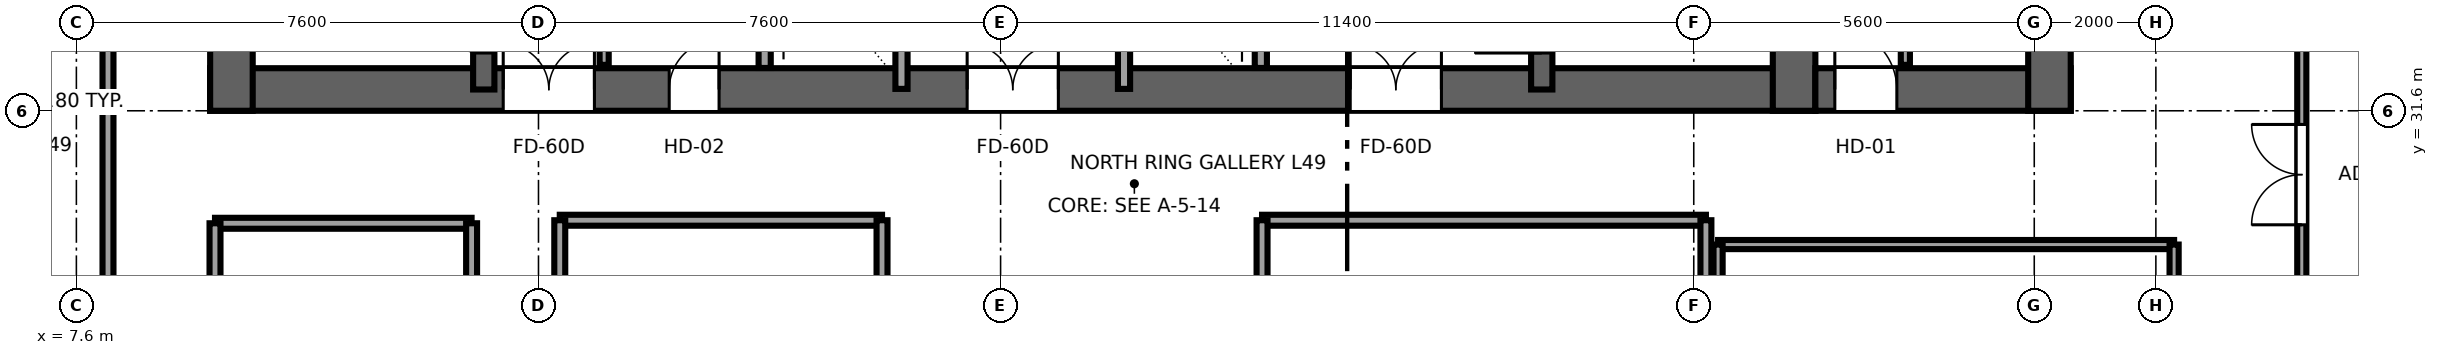
"""IFC4 building model, lengths in metres.
Left out: names, types, materials, properties, quantities, classifications, styles, units other than length and angle.
Written with IfcOpenShell. Run it as: python <this file> out.ifc"""

import sys

from ifc_helpers import new_model, si_unit, direction, frame, frame_2d, origin, place, context, subcontext, project, spatial, rectangle, extrude, source, transform, mapped, element, fill, save


model = new_model("IFC4")
c1 = context("Model", 3, precision=1e-05, world=origin(), true_north=direction((0.0, 1.0)))
c2 = subcontext(c1, "Body", "Model", "MODEL_VIEW")
j1 = project(units=[si_unit("LENGTHUNIT", "METRE"), si_unit("PLANEANGLEUNIT", "RADIAN")], contexts=[c1])
p1 = place(None, origin())
s1 = spatial("IfcSite", under=j1, at=p1, CompositionType="ELEMENT")
p2 = place(p1, origin())
s2 = spatial("IfcBuilding", under=s1, at=p2, CompositionType="ELEMENT")
p3 = place(p2, frame((0.0, 0.0, 187.55)))
s3 = spatial("IfcBuildingStorey", under=s2, at=p3, CompositionType="ELEMENT", Elevation=187.55)
p4 = place(p3, frame((9.8, 31.95, 0.0), z_axis=(0.0, 0.0, 1.0), x_axis=(1.0, 0.0, 0.0)))
e1 = element("IfcWall", 1, at=p4, inside=s3, PredefinedType="SHEAR", context=c2, shape_type="SweptSolid", body=[
    extrude(rectangle(XDim=26.4, YDim=0.7, at=frame_2d((13.2, 0.0))), origin(), (0.0, 0.0, 1.0), 3.55),
])
p5 = place(p4, frame((6.32, 0.0, 0.0), z_axis=(0.0, 0.0, 1.0), x_axis=(-1.0, 0.0, 0.0)))
e2 = element("IfcOpeningElement", 2, at=p5, cuts=e1, PredefinedType="OPENING", context=c2, shape_type="SweptSolid", body=[
    extrude(rectangle(XDim=1.5, YDim=2.04, at=frame_2d((0.75, 1.02))), frame((0.0, 0.36, 0.0), z_axis=(0.0, -1.0, 0.0), x_axis=(1.0, 0.0, 0.0)), (0.0, 0.0, 1.0), 0.72),
])
p6 = place(p4, frame((13.95, 0.0, 0.0), z_axis=(0.0, 0.0, 1.0), x_axis=(-1.0, 0.0, 0.0)))
e3 = element("IfcOpeningElement", 3, at=p6, cuts=e1, PredefinedType="OPENING", context=c2, shape_type="SweptSolid", body=[
    extrude(rectangle(XDim=1.5, YDim=2.04, at=frame_2d((0.75, 1.02))), frame((0.0, 0.36, 0.0), z_axis=(0.0, -1.0, 0.0), x_axis=(1.0, 0.0, 0.0)), (0.0, 0.0, 1.0), 0.72),
])
p7 = place(p4, frame((20.25, 0.0, 0.0), z_axis=(0.0, 0.0, 1.0), x_axis=(-1.0, 0.0, 0.0)))
e4 = element("IfcOpeningElement", 4, at=p7, cuts=e1, PredefinedType="OPENING", context=c2, shape_type="SweptSolid", body=[
    extrude(rectangle(XDim=1.5, YDim=2.04, at=frame_2d((0.75, 1.02))), frame((0.0, 0.36, 0.0), z_axis=(0.0, -1.0, 0.0), x_axis=(1.0, 0.0, 0.0)), (0.0, 0.0, 1.0), 0.72),
])
p8 = place(p4, frame((8.37, 0.0, 0.0), z_axis=(0.0, 0.0, 1.0), x_axis=(-1.0, 0.0, 0.0)))
e5 = element("IfcOpeningElement", 5, at=p8, cuts=e1, PredefinedType="OPENING", context=c2, shape_type="SweptSolid", body=[
    extrude(rectangle(XDim=0.82, YDim=2.01, at=frame_2d((0.41, 1.005))), frame((0.0, 0.36, 0.0), z_axis=(0.0, -1.0, 0.0), x_axis=(1.0, 0.0, 0.0)), (0.0, 0.0, 1.0), 0.72),
])
for number, where, z_axis, x_axis in (
    (6, (10.15, 31.6, 0.0), (0.0, 0.0, 1.0), (0.0, 1.0, 0.0)),
    (7, (35.85, 31.6, 0.0), (0.0, 0.0, 1.0), (0.0, 1.0, 0.0)),
):
    element("IfcWall", number, at=place(p3, frame(where, z_axis=z_axis, x_axis=x_axis)), inside=s3, PredefinedType="SHEAR", context=c2, shape_type="SweptSolid", body=[
        extrude(rectangle(XDim=13.6, YDim=0.7, at=frame_2d((6.8, 0.0))), origin(), (0.0, 0.0, 1.0), 3.55),
    ])
p9 = place(p3, frame((14.3, 31.95, 0.0), z_axis=(0.0, 0.0, 1.0), x_axis=(0.0, 1.0, 0.0)))
e8 = element("IfcWall", 8, at=p9, inside=s3, PredefinedType="SHEAR", context=c2, shape_type="SweptSolid", body=[
    extrude(rectangle(XDim=12.9, YDim=0.35, at=frame_2d((6.45, 0.0))), origin(), (0.0, 0.0, 1.0), 3.55),
])
p10 = place(p9, frame((0.6, 0.0, 0.0)))
e9 = element("IfcOpeningElement", 9, at=p10, cuts=e8, PredefinedType="OPENING", context=c2, shape_type="SweptSolid", body=[
    extrude(rectangle(XDim=1.1, YDim=2.12, at=frame_2d((0.55, 1.06))), frame((0.0, 0.185, 0.0), z_axis=(0.0, -1.0, 0.0), x_axis=(1.0, 0.0, 0.0)), (0.0, 0.0, 1.0), 0.37),
])
p11 = place(p3, frame((31.7, 31.95, 0.0), z_axis=(0.0, 0.0, 1.0), x_axis=(0.0, 1.0, 0.0)))
e10 = element("IfcWall", 10, at=p11, inside=s3, PredefinedType="SHEAR", context=c2, shape_type="SweptSolid", body=[
    extrude(rectangle(XDim=12.9, YDim=0.35, at=frame_2d((6.45, 0.0))), origin(), (0.0, 0.0, 1.0), 3.55),
])
p12 = place(p11, frame((1.7, 0.0, 0.0), z_axis=(0.0, 0.0, 1.0), x_axis=(-1.0, 0.0, 0.0)))
e11 = element("IfcOpeningElement", 11, at=p12, cuts=e10, PredefinedType="OPENING", context=c2, shape_type="SweptSolid", body=[
    extrude(rectangle(XDim=1.1, YDim=2.12, at=frame_2d((0.55, 1.06))), frame((0.0, 0.185, 0.0), z_axis=(0.0, -1.0, 0.0), x_axis=(1.0, 0.0, 0.0)), (0.0, 0.0, 1.0), 0.37),
])
p13 = place(p3, frame((36.2, 31.95, 0.0), z_axis=(0.0, 0.0, 1.0), x_axis=(1.0, 0.0, 0.0)))
e12 = element("IfcWall", 12, at=p13, inside=s3, PredefinedType="SHEAR", context=c2, shape_type="SweptSolid", body=[
    extrude(rectangle(XDim=4.2, YDim=0.7, at=frame_2d((2.1, 0.0))), origin(), (0.0, 0.0, 1.0), 3.55),
])
p14 = place(p13, frame((1.34, 0.0, 0.0), z_axis=(0.0, 0.0, 1.0), x_axis=(-1.0, 0.0, 0.0)))
e13 = element("IfcOpeningElement", 13, at=p14, cuts=e12, PredefinedType="OPENING", context=c2, shape_type="SweptSolid", body=[
    extrude(rectangle(XDim=1.02, YDim=2.03, at=frame_2d((0.51, 1.015))), frame((0.0, 0.36, 0.0), z_axis=(0.0, -1.0, 0.0), x_axis=(1.0, 0.0, 0.0)), (0.0, 0.0, 1.0), 0.72),
])
p15 = place(p3, frame((40.05, 31.6, 0.0), z_axis=(0.0, 0.0, 1.0), x_axis=(0.0, 1.0, 0.0)))
e14 = element("IfcWall", 14, at=p15, inside=s3, PredefinedType="SHEAR", context=c2, shape_type="SweptSolid", body=[
    extrude(rectangle(XDim=13.6, YDim=0.7, at=frame_2d((6.8, 0.0))), origin(), (0.0, 0.0, 1.0), 3.55),
])
for number, where, z_axis, x_axis in (
    (15, (18.92, 32.304, 0.0), (0.0, 0.0, 1.0), (0.0, 1.0, 0.0)),
    (16, (27.08, 32.304, 0.0), (0.0, 0.0, 1.0), (0.0, 1.0, 0.0)),
):
    element("IfcWall", number, at=place(p3, frame(where, z_axis=z_axis, x_axis=x_axis)), inside=s3, PredefinedType="SOLIDWALL", context=c2, shape_type="SweptSolid", body=[
        extrude(rectangle(XDim=3.846, YDim=0.2, at=frame_2d((1.923, 0.0))), origin(), (0.0, 0.0, 1.0), 3.37),
    ])
p16 = place(p3, frame((21.17, 31.96, 0.0), z_axis=(0.0, 0.0, 1.0), x_axis=(0.0, 1.0, 0.0)))
e17 = element("IfcWall", 17, at=p16, inside=s3, PredefinedType="SOLIDWALL", context=c2, shape_type="SweptSolid", body=[
    extrude(rectangle(XDim=12.58, YDim=0.2, at=frame_2d((6.29, 0.0))), origin(), (0.0, 0.0, 1.0), 3.37),
])
p17 = place(p16, frame((5.74, 0.0, 0.0)))
e18 = element("IfcOpeningElement", 18, at=p17, cuts=e17, PredefinedType="OPENING", context=c2, shape_type="SweptSolid", body=[
    extrude(rectangle(XDim=1.1, YDim=2.12, at=frame_2d((0.55, 1.06))), frame((0.0, 0.11, 0.0), z_axis=(0.0, -1.0, 0.0), x_axis=(1.0, 0.0, 0.0)), (0.0, 0.0, 1.0), 0.22),
])
p18 = place(p16, frame((8.24, 0.0, 0.0)))
e19 = element("IfcOpeningElement", 19, at=p18, cuts=e17, PredefinedType="OPENING", context=c2, shape_type="SweptSolid", body=[
    extrude(rectangle(XDim=1.1, YDim=2.12, at=frame_2d((0.55, 1.06))), frame((0.0, 0.11, 0.0), z_axis=(0.0, -1.0, 0.0), x_axis=(1.0, 0.0, 0.0)), (0.0, 0.0, 1.0), 0.22),
])
p19 = place(p3, frame((24.83, 31.96, 0.0), z_axis=(0.0, 0.0, 1.0), x_axis=(0.0, 1.0, 0.0)))
e20 = element("IfcWall", 20, at=p19, inside=s3, PredefinedType="SOLIDWALL", context=c2, shape_type="SweptSolid", body=[
    extrude(rectangle(XDim=12.58, YDim=0.2, at=frame_2d((6.29, 0.0))), origin(), (0.0, 0.0, 1.0), 3.37),
])
p20 = place(p19, frame((5.74, 0.0, 0.0)))
e21 = element("IfcOpeningElement", 21, at=p20, cuts=e20, PredefinedType="OPENING", context=c2, shape_type="SweptSolid", body=[
    extrude(rectangle(XDim=1.1, YDim=2.12, at=frame_2d((0.55, 1.06))), frame((0.0, 0.11, 0.0), z_axis=(0.0, -1.0, 0.0), x_axis=(1.0, 0.0, 0.0)), (0.0, 0.0, 1.0), 0.22),
])
p21 = place(p19, frame((8.24, 0.0, 0.0)))
e22 = element("IfcOpeningElement", 22, at=p21, cuts=e20, PredefinedType="OPENING", context=c2, shape_type="SweptSolid", body=[
    extrude(rectangle(XDim=1.1, YDim=2.12, at=frame_2d((0.55, 1.06))), frame((0.0, 0.11, 0.0), z_axis=(0.0, -1.0, 0.0), x_axis=(1.0, 0.0, 0.0)), (0.0, 0.0, 1.0), 0.22),
])
p22 = place(p3, frame((16.28, 32.355, 0.0), z_axis=(0.0, 0.0, 1.0), x_axis=(0.0, 1.0, 0.0)))
e23 = element("IfcWall", 23, at=p22, inside=s3, PredefinedType="PARTITIONING", context=c2, shape_type="SweptSolid", body=[
    extrude(rectangle(XDim=0.865, YDim=0.15, at=frame_2d((0.433, 0.0))), origin(), (0.0, 0.0, 1.0), 3.37),
])
p23 = place(p3, frame((37.68, 32.355, 0.0), z_axis=(0.0, 0.0, 1.0), x_axis=(0.0, 1.0, 0.0)))
e24 = element("IfcWall", 24, at=p23, inside=s3, PredefinedType="PARTITIONING", context=c2, shape_type="SweptSolid", body=[
    extrude(rectangle(XDim=3.845, YDim=0.15, at=frame_2d((1.922, 0.0))), origin(), (0.0, 0.0, 1.0), 3.37),
])
p24 = place(p23, frame((1.413, 0.0, 0.0)))
e25 = element("IfcOpeningElement", 25, at=p24, cuts=e24, PredefinedType="OPENING", context=c2, shape_type="SweptSolid", body=[
    extrude(rectangle(XDim=1.02, YDim=2.03, at=frame_2d((0.51, 1.015))), frame((0.0, 0.085, 0.0), z_axis=(0.0, -1.0, 0.0), x_axis=(1.0, 0.0, 0.0)), (0.0, 0.0, 1.0), 0.17),
])
p25 = place(p3, frame((8.12, 22.7, 0.0), z_axis=(0.0, 0.0, 1.0), x_axis=(0.0, 1.0, 0.0)))
e26 = element("IfcWall", 26, at=p25, inside=s3, PredefinedType="PARTITIONING", context=c2, shape_type="SweptSolid", body=[
    extrude(rectangle(XDim=13.1, YDim=0.18, at=frame_2d((6.55, 0.0))), origin(), (0.0, 0.0, 1.0), 3.37),
])
p26 = place(p25, frame((3.35, 0.0, 0.0)))
e27 = element("IfcOpeningElement", 27, at=p26, cuts=e26, PredefinedType="OPENING", context=c2, shape_type="SweptSolid", body=[
    extrude(rectangle(XDim=1.65, YDim=2.15, at=frame_2d((0.825, 1.075))), frame((0.0, 0.1, 0.0), z_axis=(0.0, -1.0, 0.0), x_axis=(1.0, 0.0, 0.0)), (0.0, 0.0, 1.0), 0.2),
])
p27 = place(p3, frame((44.2, 26.5, 0.0), z_axis=(0.0, 0.0, 1.0), x_axis=(0.0, 1.0, 0.0)))
e28 = element("IfcWall", 28, at=p27, inside=s3, PredefinedType="PARTITIONING", context=c2, shape_type="SweptSolid", body=[
    extrude(rectangle(XDim=8.1, YDim=0.15, at=frame_2d((4.05, 0.0))), origin(), (0.0, 0.0, 1.0), 3.37),
])
p28 = place(p27, frame((3.225, 0.0, 0.0)))
e29 = element("IfcOpeningElement", 29, at=p28, cuts=e28, PredefinedType="OPENING", context=c2, shape_type="SweptSolid", body=[
    extrude(rectangle(XDim=1.65, YDim=2.15, at=frame_2d((0.825, 1.075))), frame((0.0, 0.085, 0.0), z_axis=(0.0, -1.0, 0.0), x_axis=(1.0, 0.0, 0.0)), (0.0, 0.0, 1.0), 0.17),
])
p29 = place(p3, frame((9.88, 29.75, 0.0), z_axis=(0.0, 0.0, 1.0), x_axis=(1.0, 0.0, 0.0)))
e30 = element("IfcWall", 30, at=p29, inside=s3, PredefinedType="PARTITIONING", context=c2, shape_type="SweptSolid", body=[
    extrude(rectangle(XDim=4.22, YDim=0.18, at=frame_2d((2.11, 0.0))), origin(), (0.0, 0.0, 1.0), 3.37),
])
for number, where, z_axis, x_axis in (
    (31, (9.88, 22.7, 0.0), (0.0, 0.0, 1.0), (0.0, 1.0, 0.0)),
    (32, (14.1, 22.7, 0.0), (0.0, 0.0, 1.0), (0.0, 1.0, 0.0)),
):
    element("IfcWall", number, at=place(p3, frame(where, z_axis=z_axis, x_axis=x_axis)), inside=s3, PredefinedType="PARTITIONING", context=c2, shape_type="SweptSolid", body=[
        extrude(rectangle(XDim=7.05, YDim=0.18, at=frame_2d((3.525, 0.0))), origin(), (0.0, 0.0, 1.0), 3.37),
    ])
p30 = place(p3, frame((27.1, 29.8, 0.0), z_axis=(0.0, 0.0, 1.0), x_axis=(1.0, 0.0, 0.0)))
e33 = element("IfcWall", 33, at=p30, inside=s3, PredefinedType="PARTITIONING", context=c2, shape_type="SweptSolid", body=[
    extrude(rectangle(XDim=7.3, YDim=0.18, at=frame_2d((3.65, 0.0))), origin(), (0.0, 0.0, 1.0), 3.37),
])
for number, where, z_axis, x_axis in (
    (34, (27.1, 22.7, 0.0), (0.0, 0.0, 1.0), (0.0, 1.0, 0.0)),
    (35, (34.4, 22.7, 0.0), (0.0, 0.0, 1.0), (0.0, 1.0, 0.0)),
):
    element("IfcWall", number, at=place(p3, frame(where, z_axis=z_axis, x_axis=x_axis)), inside=s3, PredefinedType="PARTITIONING", context=c2, shape_type="SweptSolid", body=[
        extrude(rectangle(XDim=7.1, YDim=0.18, at=frame_2d((3.55, 0.0))), origin(), (0.0, 0.0, 1.0), 3.37),
    ])
p31 = place(p3, frame((15.55, 29.8, 0.0), z_axis=(0.0, 0.0, 1.0), x_axis=(1.0, 0.0, 0.0)))
e36 = element("IfcWall", 36, at=p31, inside=s3, PredefinedType="PARTITIONING", context=c2, shape_type="SweptSolid", body=[
    extrude(rectangle(XDim=5.3, YDim=0.18, at=frame_2d((2.65, 0.0))), origin(), (0.0, 0.0, 1.0), 3.37),
])
for number, where, z_axis, x_axis in (
    (37, (15.55, 22.7, 0.0), (0.0, 0.0, 1.0), (0.0, 1.0, 0.0)),
    (38, (20.85, 22.7, 0.0), (0.0, 0.0, 1.0), (0.0, 1.0, 0.0)),
):
    element("IfcWall", number, at=place(p3, frame(where, z_axis=z_axis, x_axis=x_axis)), inside=s3, PredefinedType="PARTITIONING", context=c2, shape_type="SweptSolid", body=[
        extrude(rectangle(XDim=7.1, YDim=0.18, at=frame_2d((3.55, 0.0))), origin(), (0.0, 0.0, 1.0), 3.37),
    ])
p32 = place(p3, frame((34.6, 29.4, 0.0), z_axis=(0.0, 0.0, 1.0), x_axis=(1.0, 0.0, 0.0)))
e39 = element("IfcWall", 39, at=p32, inside=s3, PredefinedType="PARTITIONING", context=c2, shape_type="SweptSolid", body=[
    extrude(rectangle(XDim=7.5, YDim=0.15, at=frame_2d((3.75, 0.0))), origin(), (0.0, 0.0, 1.0), 3.37),
])
p33 = place(p3, frame((34.6, 22.7, 0.0), z_axis=(0.0, 0.0, 1.0), x_axis=(0.0, 1.0, 0.0)))
e40 = element("IfcWall", 40, at=p33, inside=s3, PredefinedType="PARTITIONING", context=c2, shape_type="SweptSolid", body=[
    extrude(rectangle(XDim=6.7, YDim=0.15, at=frame_2d((3.35, 0.0))), origin(), (0.0, 0.0, 1.0), 3.37),
])
p34 = place(p3, frame((42.1, 22.7, 0.0), z_axis=(0.0, 0.0, 1.0), x_axis=(0.0, 1.0, 0.0)))
e41 = element("IfcWall", 41, at=p34, inside=s3, PredefinedType="PARTITIONING", context=c2, shape_type="SweptSolid", body=[
    extrude(rectangle(XDim=6.7, YDim=0.15, at=frame_2d((3.35, 0.0))), origin(), (0.0, 0.0, 1.0), 2.16),
])
m1 = source(origin(), c2, "Body", "SweptSolid", [
    extrude(rectangle(XDim=1.1, YDim=2.12, at=frame_2d((0.55, 1.06))), frame((0.0, 0.025, 0.0), z_axis=(0.0, -1.0, 0.0), x_axis=(1.0, 0.0, 0.0)), (0.0, 0.0, 1.0), 0.05),
])
p35 = place(p10, origin())
e42 = element("IfcDoor", 42, at=p35, inside=s3, OperationType="SINGLE_SWING_RIGHT", PredefinedType="DOOR", context=c2, shape_type="MappedRepresentation", body=[
    mapped(m1, transform((0.0, 0.0, 0.0), x_axis=(1.0, 0.0, 0.0), y_axis=(0.0, 1.0, 0.0), z_axis=(0.0, 0.0, 1.0), scale=1.0)),
])
fill(e9, e42)
p36 = place(p12, origin())
e43 = element("IfcDoor", 43, at=p36, inside=s3, OperationType="SINGLE_SWING_LEFT", PredefinedType="DOOR", context=c2, shape_type="MappedRepresentation", body=[
    mapped(m1, transform((0.0, 0.0, 0.0), x_axis=(1.0, 0.0, 0.0), y_axis=(0.0, 1.0, 0.0), z_axis=(0.0, 0.0, 1.0), scale=1.0)),
])
fill(e11, e43)
m2 = source(origin(), c2, "Body", "SweptSolid", [
    extrude(rectangle(XDim=1.5, YDim=2.04, at=frame_2d((0.75, 1.02))), frame((0.0, 0.025, 0.0), z_axis=(0.0, -1.0, 0.0), x_axis=(1.0, 0.0, 0.0)), (0.0, 0.0, 1.0), 0.05),
])
p37 = place(p5, origin())
e44 = element("IfcDoor", 44, at=p37, inside=s3, OperationType="DOUBLE_DOOR_SINGLE_SWING", PredefinedType="DOOR", context=c2, shape_type="MappedRepresentation", body=[
    mapped(m2, transform((0.0, 0.0, 0.0), x_axis=(1.0, 0.0, 0.0), y_axis=(0.0, 1.0, 0.0), z_axis=(0.0, 0.0, 1.0), scale=1.0)),
])
fill(e2, e44)
p38 = place(p6, origin())
e45 = element("IfcDoor", 45, at=p38, inside=s3, OperationType="DOUBLE_DOOR_SINGLE_SWING", PredefinedType="DOOR", context=c2, shape_type="MappedRepresentation", body=[
    mapped(m2, transform((0.0, 0.0, 0.0), x_axis=(1.0, 0.0, 0.0), y_axis=(0.0, 1.0, 0.0), z_axis=(0.0, 0.0, 1.0), scale=1.0)),
])
fill(e3, e45)
p39 = place(p7, origin())
e46 = element("IfcDoor", 46, at=p39, inside=s3, OperationType="DOUBLE_DOOR_SINGLE_SWING", PredefinedType="DOOR", context=c2, shape_type="MappedRepresentation", body=[
    mapped(m2, transform((0.0, 0.0, 0.0), x_axis=(1.0, 0.0, 0.0), y_axis=(0.0, 1.0, 0.0), z_axis=(0.0, 0.0, 1.0), scale=1.0)),
])
fill(e4, e46)
m3 = source(origin(), c2, "Body", "SweptSolid", [
    extrude(rectangle(XDim=0.82, YDim=2.01, at=frame_2d((0.41, 1.005))), frame((0.0, 0.025, 0.0), z_axis=(0.0, -1.0, 0.0), x_axis=(1.0, 0.0, 0.0)), (0.0, 0.0, 1.0), 0.05),
])
p40 = place(p8, origin())
e47 = element("IfcDoor", 47, at=p40, inside=s3, OperationType="SINGLE_SWING_RIGHT", PredefinedType="DOOR", context=c2, shape_type="MappedRepresentation", body=[
    mapped(m3, transform((0.0, 0.0, 0.0), x_axis=(1.0, 0.0, 0.0), y_axis=(0.0, 1.0, 0.0), z_axis=(0.0, 0.0, 1.0), scale=1.0)),
])
fill(e5, e47)
m4 = source(origin(), c2, "Body", "SweptSolid", [
    extrude(rectangle(XDim=1.02, YDim=2.03, at=frame_2d((0.51, 1.015))), frame((0.0, 0.025, 0.0), z_axis=(0.0, -1.0, 0.0), x_axis=(1.0, 0.0, 0.0)), (0.0, 0.0, 1.0), 0.05),
])
p41 = place(p14, origin())
e48 = element("IfcDoor", 48, at=p41, inside=s3, OperationType="SINGLE_SWING_LEFT", PredefinedType="DOOR", context=c2, shape_type="MappedRepresentation", body=[
    mapped(m4, transform((0.0, 0.0, 0.0), x_axis=(1.0, 0.0, 0.0), y_axis=(0.0, 1.0, 0.0), z_axis=(0.0, 0.0, 1.0), scale=1.0)),
])
fill(e13, e48)
m5 = source(origin(), c2, "Body", "SweptSolid", [
    extrude(rectangle(XDim=1.65, YDim=2.15, at=frame_2d((0.825, 1.075))), frame((0.0, 0.025, 0.0), z_axis=(0.0, -1.0, 0.0), x_axis=(1.0, 0.0, 0.0)), (0.0, 0.0, 1.0), 0.05),
])
p42 = place(p28, origin())
e49 = element("IfcDoor", 49, at=p42, inside=s3, OperationType="DOUBLE_DOOR_SINGLE_SWING", PredefinedType="DOOR", context=c2, shape_type="MappedRepresentation", body=[
    mapped(m5, transform((0.0, 0.0, 0.0), x_axis=(1.0, 0.0, 0.0), y_axis=(0.0, 1.0, 0.0), z_axis=(0.0, 0.0, 1.0), scale=1.0)),
])
fill(e29, e49)
save(model, sys.argv[1])
